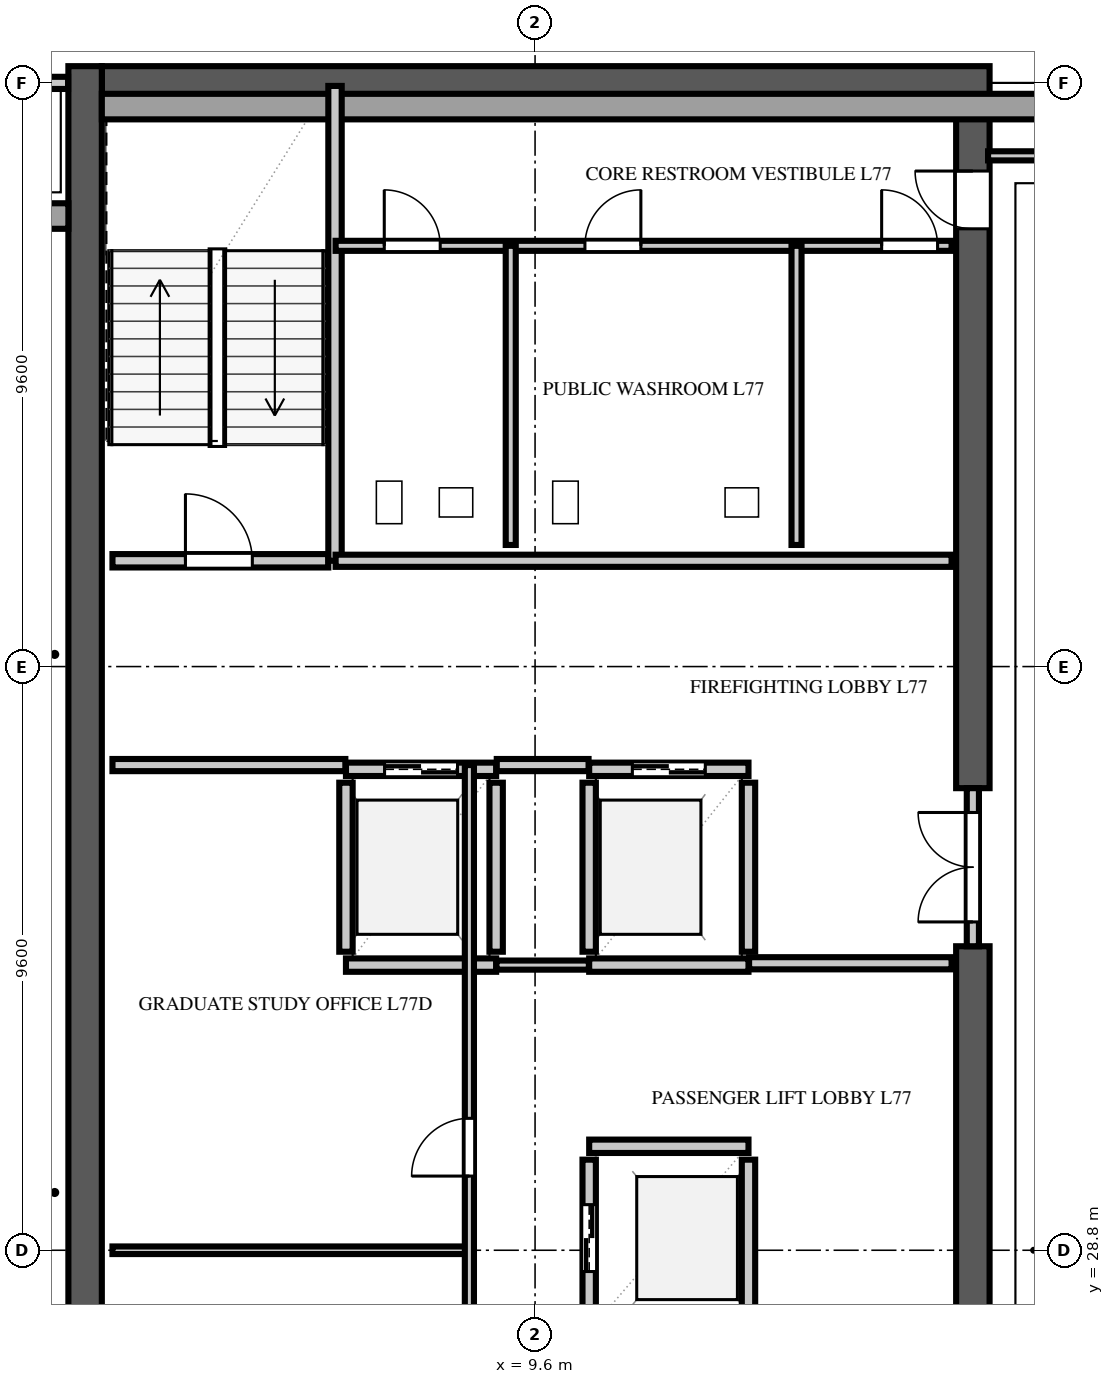
"""IFC4 building model, lengths in metres.
Left out: names, types, materials, properties, quantities, classifications, styles, units other than length and angle.
Written with IfcOpenShell. Run it as: python <this file> out.ifc"""

import sys

from ifc_helpers import new_model, si_unit, direction, frame, frame_2d, origin, place, context, subcontext, project, spatial, rectangle, extrude, element, fill, save


model = new_model("IFC4")
c1 = context("Model", 3, precision=1e-05, world=origin(), true_north=direction((0.0, 1.0)))
c2 = subcontext(c1, "Body", "Model", "MODEL_VIEW")
j1 = project(units=[si_unit("LENGTHUNIT", "METRE"), si_unit("PLANEANGLEUNIT", "RADIAN")], contexts=[c1])
p1 = place(None, origin())
s1 = spatial("IfcSite", under=j1, at=p1, CompositionType="ELEMENT")
p2 = place(p1, origin())
s2 = spatial("IfcBuilding", under=s1, at=p2, CompositionType="ELEMENT")
p3 = place(p2, frame((0.0, 0.0, 303.8)))
s3 = spatial("IfcBuildingStorey", under=s2, at=p3, CompositionType="ELEMENT", Elevation=303.8)
p4 = place(p3, frame((2.475, 48.0, 0.0), z_axis=(0.0, 0.0, 1.0), x_axis=(1.0, 0.0, 0.0)))
e1 = element("IfcWall", 1, at=p4, inside=s3, PredefinedType="SHEAR", context=c2, shape_type="SweptSolid", body=[
    extrude(rectangle(XDim=14.6, YDim=0.55, at=frame_2d((7.3, 0.0))), origin(), (0.0, 0.0, 1.0), 3.88),
])
p5 = place(p3, frame((2.2, 9.325, 0.0), z_axis=(0.0, 0.0, 1.0), x_axis=(0.0, 1.0, 0.0)))
e2 = element("IfcWall", 2, at=p5, inside=s3, PredefinedType="SHEAR", context=c2, shape_type="SweptSolid", body=[
    extrude(rectangle(XDim=38.95, YDim=0.55, at=frame_2d((19.475, 0.0))), origin(), (0.0, 0.0, 1.0), 3.88),
])
p6 = place(p3, frame((16.8, 26.0, 0.0), z_axis=(0.0, 0.0, 1.0), x_axis=(0.0, 1.0, 0.0)))
e3 = element("IfcWall", 3, at=p6, inside=s3, PredefinedType="SHEAR", context=c2, shape_type="SweptSolid", body=[
    extrude(rectangle(XDim=7.8, YDim=0.55, at=frame_2d((3.9, 0.0))), origin(), (0.0, 0.0, 1.0), 3.88),
])
p7 = place(p3, frame((16.8, 36.4, 0.0), z_axis=(0.0, 0.0, 1.0), x_axis=(0.0, 1.0, 0.0)))
e4 = element("IfcWall", 4, at=p7, inside=s3, PredefinedType="SHEAR", context=c2, shape_type="SweptSolid", body=[
    extrude(rectangle(XDim=11.325, YDim=0.55, at=frame_2d((5.663, 0.0))), origin(), (0.0, 0.0, 1.0), 3.88),
])
p8 = place(p7, frame((9.2, 0.0, 0.0)))
e5 = element("IfcOpeningElement", 5, at=p8, cuts=e4, PredefinedType="OPENING", context=c2, shape_type="SweptSolid", body=[
    extrude(rectangle(XDim=0.95, YDim=2.15, at=frame_2d((0.475, 1.075))), frame((0.0, 0.287, 0.0), z_axis=(0.0, -1.0, 0.0), x_axis=(1.0, 0.0, 0.0)), (0.0, 0.0, 1.0), 0.574),
])
p9 = place(p3, frame((36.56, 47.61, 0.0), z_axis=(0.0, 0.0, 1.0), x_axis=(-1.0, 0.0, 0.0)))
e6 = element("IfcWall", 6, at=p9, inside=s3, PredefinedType="SOLIDWALL", context=c2, shape_type="SweptSolid", body=[
    extrude(rectangle(XDim=34.085, YDim=0.42, at=frame_2d((17.042, 0.0))), origin(), (0.0, 0.0, 1.0), 3.88),
])
p10 = place(p9, frame((8.76, 0.0, 0.75)))
e7 = element("IfcOpeningElement", 7, at=p10, cuts=e6, PredefinedType="OPENING", context=c2, shape_type="SweptSolid", body=[
    extrude(rectangle(XDim=2.8, YDim=2.3, at=frame_2d((1.4, 1.15))), frame((0.0, 0.222, 0.0), z_axis=(0.0, -1.0, 0.0), x_axis=(1.0, 0.0, 0.0)), (0.0, 0.0, 1.0), 0.444),
])
p11 = place(p9, frame((13.56, 0.0, 0.75)))
e8 = element("IfcOpeningElement", 8, at=p11, cuts=e6, PredefinedType="OPENING", context=c2, shape_type="SweptSolid", body=[
    extrude(rectangle(XDim=2.8, YDim=2.3, at=frame_2d((1.4, 1.15))), frame((0.0, 0.222, 0.0), z_axis=(0.0, -1.0, 0.0), x_axis=(1.0, 0.0, 0.0)), (0.0, 0.0, 1.0), 0.444),
])
p12 = place(p3, frame((1.925, 45.81, 0.0), z_axis=(0.0, 0.0, 1.0), x_axis=(-1.0, 0.0, 0.0)))
e9 = element("IfcWall", 9, at=p12, inside=s3, PredefinedType="SOLIDWALL", context=c2, shape_type="SweptSolid", body=[
    extrude(rectangle(XDim=1.885, YDim=0.42, at=frame_2d((0.942, 0.0))), origin(), (0.0, 0.0, 1.0), 3.88),
])
p13 = place(p3, frame((2.65, 40.14, 0.0), z_axis=(0.0, 0.0, 1.0), x_axis=(1.0, 0.0, 0.0)))
e10 = element("IfcWall", 10, at=p13, inside=s3, PredefinedType="SOLIDWALL", context=c2, shape_type="SweptSolid", body=[
    extrude(rectangle(XDim=3.55, YDim=0.22, at=frame_2d((1.775, 0.0))), origin(), (0.0, 0.0, 1.0), 3.88),
])
p14 = place(p13, frame((1.2, 0.0, 0.0)))
e11 = element("IfcOpeningElement", 11, at=p14, cuts=e10, PredefinedType="OPENING", context=c2, shape_type="SweptSolid", body=[
    extrude(rectangle(XDim=1.1, YDim=2.2, at=frame_2d((0.55, 1.1))), frame((0.0, 0.122, 0.0), z_axis=(0.0, -1.0, 0.0), x_axis=(1.0, 0.0, 0.0)), (0.0, 0.0, 1.0), 0.244),
])
p15 = place(p3, frame((6.31, 40.14, 0.0), z_axis=(0.0, 0.0, 1.0), x_axis=(0.0, 1.0, 0.0)))
e12 = element("IfcWall", 12, at=p15, inside=s3, PredefinedType="SOLIDWALL", context=c2, shape_type="SweptSolid", body=[
    extrude(rectangle(XDim=7.81, YDim=0.22, at=frame_2d((3.905, 0.0))), origin(), (0.0, 0.0, 1.0), 3.88),
])
p16 = place(p3, frame((10.49, 27.71, 0.0), z_axis=(0.0, 0.0, 1.0), x_axis=(0.0, 1.0, 0.0)))
e13 = element("IfcWall", 13, at=p16, inside=s3, PredefinedType="SOLIDWALL", context=c2, shape_type="SweptSolid", body=[
    extrude(rectangle(XDim=2.58, YDim=0.22, at=frame_2d((1.29, 0.0))), origin(), (0.0, 0.0, 1.0), 3.88),
])
p17 = place(p16, frame((0.74, 0.0, 0.0)))
e14 = element("IfcOpeningElement", 14, at=p17, cuts=e13, PredefinedType="OPENING", context=c2, shape_type="SweptSolid", body=[
    extrude(rectangle(XDim=1.1, YDim=2.2, at=frame_2d((0.55, 1.1))), frame((0.0, 0.122, 0.0), z_axis=(0.0, -1.0, 0.0), x_axis=(1.0, 0.0, 0.0)), (0.0, 0.0, 1.0), 0.244),
])
p18 = place(p3, frame((13.11, 27.71, 0.0), z_axis=(0.0, 0.0, 1.0), x_axis=(0.0, 1.0, 0.0)))
e15 = element("IfcWall", 15, at=p18, inside=s3, PredefinedType="SOLIDWALL", context=c2, shape_type="SweptSolid", body=[
    extrude(rectangle(XDim=2.58, YDim=0.22, at=frame_2d((1.29, 0.0))), origin(), (0.0, 0.0, 1.0), 3.88),
])
p19 = place(p3, frame((10.49, 30.51, 0.0), z_axis=(0.0, 0.0, 1.0), x_axis=(1.0, 0.0, 0.0)))
e16 = element("IfcWall", 16, at=p19, inside=s3, PredefinedType="SOLIDWALL", context=c2, shape_type="SweptSolid", body=[
    extrude(rectangle(XDim=2.62, YDim=0.22, at=frame_2d((1.31, 0.0))), origin(), (0.0, 0.0, 1.0), 3.88),
])
for number, where, z_axis, x_axis in (
    (17, (6.49, 33.71, 0.0), (0.0, 0.0, 1.0), (0.0, 1.0, 0.0)),
    (18, (8.96, 33.71, 0.0), (0.0, 0.0, 1.0), (0.0, 1.0, 0.0)),
):
    element("IfcWall", number, at=place(p3, frame(where, z_axis=z_axis, x_axis=x_axis)), inside=s3, PredefinedType="SOLIDWALL", context=c2, shape_type="SweptSolid", body=[
        extrude(rectangle(XDim=2.78, YDim=0.22, at=frame_2d((1.39, 0.0))), origin(), (0.0, 0.0, 1.0), 3.88),
    ])
p20 = place(p3, frame((6.49, 33.49, 0.0), z_axis=(0.0, 0.0, 1.0), x_axis=(1.0, 0.0, 0.0)))
e19 = element("IfcWall", 19, at=p20, inside=s3, PredefinedType="SOLIDWALL", context=c2, shape_type="SweptSolid", body=[
    extrude(rectangle(XDim=2.47, YDim=0.22, at=frame_2d((1.235, 0.0))), origin(), (0.0, 0.0, 1.0), 3.88),
])
p21 = place(p3, frame((6.49, 36.71, 0.0), z_axis=(0.0, 0.0, 1.0), x_axis=(1.0, 0.0, 0.0)))
e20 = element("IfcWall", 20, at=p21, inside=s3, PredefinedType="SOLIDWALL", context=c2, shape_type="SweptSolid", body=[
    extrude(rectangle(XDim=2.47, YDim=0.22, at=frame_2d((1.235, 0.0))), origin(), (0.0, 0.0, 1.0), 3.88),
])
p22 = place(p21, frame((0.635, 0.0, 0.0)))
e21 = element("IfcOpeningElement", 21, at=p22, cuts=e20, PredefinedType="OPENING", context=c2, shape_type="SweptSolid", body=[
    extrude(rectangle(XDim=1.2, YDim=2.2, at=frame_2d((0.6, 1.1))), frame((0.0, 0.122, 0.0), z_axis=(0.0, -1.0, 0.0), x_axis=(1.0, 0.0, 0.0)), (0.0, 0.0, 1.0), 0.244),
])
for number, where, z_axis, x_axis in (
    (22, (10.49, 33.71, 0.0), (0.0, 0.0, 1.0), (0.0, 1.0, 0.0)),
    (23, (13.11, 33.71, 0.0), (0.0, 0.0, 1.0), (0.0, 1.0, 0.0)),
):
    element("IfcWall", number, at=place(p3, frame(where, z_axis=z_axis, x_axis=x_axis)), inside=s3, PredefinedType="SOLIDWALL", context=c2, shape_type="SweptSolid", body=[
        extrude(rectangle(XDim=2.78, YDim=0.22, at=frame_2d((1.39, 0.0))), origin(), (0.0, 0.0, 1.0), 3.88),
    ])
p23 = place(p3, frame((10.49, 33.49, 0.0), z_axis=(0.0, 0.0, 1.0), x_axis=(1.0, 0.0, 0.0)))
e24 = element("IfcWall", 24, at=p23, inside=s3, PredefinedType="SOLIDWALL", context=c2, shape_type="SweptSolid", body=[
    extrude(rectangle(XDim=2.62, YDim=0.22, at=frame_2d((1.31, 0.0))), origin(), (0.0, 0.0, 1.0), 3.88),
])
p24 = place(p3, frame((10.49, 36.71, 0.0), z_axis=(0.0, 0.0, 1.0), x_axis=(1.0, 0.0, 0.0)))
e25 = element("IfcWall", 25, at=p24, inside=s3, PredefinedType="SOLIDWALL", context=c2, shape_type="SweptSolid", body=[
    extrude(rectangle(XDim=2.62, YDim=0.22, at=frame_2d((1.31, 0.0))), origin(), (0.0, 0.0, 1.0), 3.88),
])
p25 = place(p24, frame((0.71, 0.0, 0.0)))
e26 = element("IfcOpeningElement", 26, at=p25, cuts=e25, PredefinedType="OPENING", context=c2, shape_type="SweptSolid", body=[
    extrude(rectangle(XDim=1.2, YDim=2.2, at=frame_2d((0.6, 1.1))), frame((0.0, 0.122, 0.0), z_axis=(0.0, -1.0, 0.0), x_axis=(1.0, 0.0, 0.0)), (0.0, 0.0, 1.0), 0.244),
])
p26 = place(p3, frame((2.65, 36.78, 0.0), z_axis=(0.0, 0.0, 1.0), x_axis=(1.0, 0.0, 0.0)))
e27 = element("IfcWall", 27, at=p26, inside=s3, PredefinedType="SOLIDWALL", context=c2, shape_type="SweptSolid", body=[
    extrude(rectangle(XDim=3.83, YDim=0.2, at=frame_2d((1.915, 0.0))), origin(), (0.0, 0.0, 1.0), 3.88),
])
p27 = place(p3, frame((8.97, 36.78, 0.0), z_axis=(0.0, 0.0, 1.0), x_axis=(1.0, 0.0, 0.0)))
e28 = element("IfcWall", 28, at=p27, inside=s3, PredefinedType="SOLIDWALL", context=c2, shape_type="SweptSolid", body=[
    extrude(rectangle(XDim=1.51, YDim=0.2, at=frame_2d((0.755, 0.0))), origin(), (0.0, 0.0, 1.0), 3.88),
])
p28 = place(p3, frame((13.12, 33.52, 0.0), z_axis=(0.0, 0.0, 1.0), x_axis=(1.0, 0.0, 0.0)))
e29 = element("IfcWall", 29, at=p28, inside=s3, PredefinedType="SOLIDWALL", context=c2, shape_type="SweptSolid", body=[
    extrude(rectangle(XDim=3.33, YDim=0.2, at=frame_2d((1.665, 0.0))), origin(), (0.0, 0.0, 1.0), 3.88),
])
p29 = place(p3, frame((6.32, 40.14, 0.0), z_axis=(0.0, 0.0, 1.0), x_axis=(1.0, 0.0, 0.0)))
e30 = element("IfcWall", 30, at=p29, inside=s3, PredefinedType="SOLIDWALL", context=c2, shape_type="SweptSolid", body=[
    extrude(rectangle(XDim=10.13, YDim=0.2, at=frame_2d((5.065, 0.0))), origin(), (0.0, 0.0, 1.0), 3.88),
])
p30 = place(p3, frame((16.8, 33.8, 0.0), z_axis=(0.0, 0.0, 1.0), x_axis=(0.0, 1.0, 0.0)))
e31 = element("IfcWall", 31, at=p30, inside=s3, PredefinedType="SOLIDWALL", context=c2, shape_type="SweptSolid", body=[
    extrude(rectangle(XDim=2.6, YDim=0.2, at=frame_2d((1.3, 0.0))), origin(), (0.0, 0.0, 1.0), 3.88),
])
p31 = place(p30, frame((0.4, 0.0, 0.0)))
e32 = element("IfcOpeningElement", 32, at=p31, cuts=e31, PredefinedType="OPENING", context=c2, shape_type="SweptSolid", body=[
    extrude(rectangle(XDim=1.8, YDim=2.2, at=frame_2d((0.9, 1.1))), frame((0.0, 0.112, 0.0), z_axis=(0.0, -1.0, 0.0), x_axis=(1.0, 0.0, 0.0)), (0.0, 0.0, 1.0), 0.224),
])
p32 = place(p3, frame((8.965, 33.49, 0.0), z_axis=(0.0, 0.0, 1.0), x_axis=(1.0, 0.0, 0.0)))
e33 = element("IfcWall", 33, at=p32, inside=s3, PredefinedType="PARTITIONING", context=c2, shape_type="SweptSolid", body=[
    extrude(rectangle(XDim=1.52, YDim=0.15, at=frame_2d((0.76, 0.0))), origin(), (0.0, 0.0, 1.0), 3.88),
])
p33 = place(p3, frame((2.65, 28.8, 0.0), z_axis=(0.0, 0.0, 1.0), x_axis=(1.0, 0.0, 0.0)))
e34 = element("IfcWall", 34, at=p33, inside=s3, PredefinedType="PARTITIONING", context=c2, shape_type="SweptSolid", body=[
    extrude(rectangle(XDim=5.87, YDim=0.125, at=frame_2d((2.935, 0.0))), origin(), (0.0, 0.0, 1.0), 3.88),
])
p34 = place(p3, frame((8.52, 12.02, 0.0), z_axis=(0.0, 0.0, 1.0), x_axis=(0.0, 1.0, 0.0)))
e35 = element("IfcWall", 35, at=p34, inside=s3, PredefinedType="PARTITIONING", context=c2, shape_type="SweptSolid", body=[
    extrude(rectangle(XDim=24.76, YDim=0.15, at=frame_2d((12.38, 0.0))), origin(), (0.0, 0.0, 1.0), 3.88),
])
p35 = place(p34, frame((2.0, 0.0, 0.0)))
e36 = element("IfcOpeningElement", 36, at=p35, cuts=e35, PredefinedType="OPENING", context=c2, shape_type="SweptSolid", body=[
    extrude(rectangle(XDim=0.85, YDim=2.1, at=frame_2d((0.425, 1.05))), frame((0.0, 0.087, 0.0), z_axis=(0.0, -1.0, 0.0), x_axis=(1.0, 0.0, 0.0)), (0.0, 0.0, 1.0), 0.174),
])
p36 = place(p34, frame((11.0, 0.0, 0.0)))
e37 = element("IfcOpeningElement", 37, at=p36, cuts=e35, PredefinedType="OPENING", context=c2, shape_type="SweptSolid", body=[
    extrude(rectangle(XDim=0.95, YDim=2.15, at=frame_2d((0.475, 1.075))), frame((0.0, 0.087, 0.0), z_axis=(0.0, -1.0, 0.0), x_axis=(1.0, 0.0, 0.0)), (0.0, 0.0, 1.0), 0.174),
])
p37 = place(p34, frame((18.0, 0.0, 0.0)))
e38 = element("IfcOpeningElement", 38, at=p37, cuts=e35, PredefinedType="OPENING", context=c2, shape_type="SweptSolid", body=[
    extrude(rectangle(XDim=0.95, YDim=2.15, at=frame_2d((0.475, 1.075))), frame((0.0, 0.087, 0.0), z_axis=(0.0, -1.0, 0.0), x_axis=(1.0, 0.0, 0.0)), (0.0, 0.0, 1.0), 0.174),
])
p38 = place(p3, frame((6.32, 45.32, 0.0), z_axis=(0.0, 0.0, 1.0), x_axis=(1.0, 0.0, 0.0)))
e39 = element("IfcWall", 39, at=p38, inside=s3, PredefinedType="PLUMBINGWALL", context=c2, shape_type="SweptSolid", body=[
    extrude(rectangle(XDim=10.13, YDim=0.165, at=frame_2d((5.065, 0.0))), origin(), (0.0, 0.0, 1.0), 3.88),
])
p39 = place(p38, frame((0.8, 0.0, 0.0)))
e40 = element("IfcOpeningElement", 40, at=p39, cuts=e39, PredefinedType="OPENING", context=c2, shape_type="SweptSolid", body=[
    extrude(rectangle(XDim=0.92, YDim=2.15, at=frame_2d((0.46, 1.075))), frame((0.0, 0.094, 0.0), z_axis=(0.0, -1.0, 0.0), x_axis=(1.0, 0.0, 0.0)), (0.0, 0.0, 1.0), 0.189),
])
p40 = place(p38, frame((4.1, 0.0, 0.0)))
e41 = element("IfcOpeningElement", 41, at=p40, cuts=e39, PredefinedType="OPENING", context=c2, shape_type="SweptSolid", body=[
    extrude(rectangle(XDim=0.92, YDim=2.15, at=frame_2d((0.46, 1.075))), frame((0.0, 0.094, 0.0), z_axis=(0.0, -1.0, 0.0), x_axis=(1.0, 0.0, 0.0)), (0.0, 0.0, 1.0), 0.189),
])
p41 = place(p38, frame((8.98, 0.0, 0.0)))
e42 = element("IfcOpeningElement", 42, at=p41, cuts=e39, PredefinedType="OPENING", context=c2, shape_type="SweptSolid", body=[
    extrude(rectangle(XDim=0.92, YDim=2.15, at=frame_2d((0.46, 1.075))), frame((0.0, 0.094, 0.0), z_axis=(0.0, -1.0, 0.0), x_axis=(1.0, 0.0, 0.0)), (0.0, 0.0, 1.0), 0.189),
])
for number, where, z_axis, x_axis in (
    (43, (9.2, 40.4, 0.0), (0.0, 0.0, 1.0), (0.0, 1.0, 0.0)),
    (44, (13.9, 40.4, 0.0), (0.0, 0.0, 1.0), (0.0, 1.0, 0.0)),
):
    element("IfcWall", number, at=place(p3, frame(where, z_axis=z_axis, x_axis=x_axis)), inside=s3, PredefinedType="PLUMBINGWALL", context=c2, shape_type="SweptSolid", body=[
        extrude(rectangle(XDim=4.92, YDim=0.165, at=frame_2d((2.46, 0.0))), origin(), (0.0, 0.0, 1.0), 3.88),
    ])
p42 = place(p3, frame((0.85, 48.0, 0.0), z_axis=(0.0, 0.0, 1.0), x_axis=(1.0, 0.0, 0.0)))
e45 = element("IfcWall", 45, at=p42, inside=s3, PredefinedType="SOLIDWALL", context=c2, shape_type="SweptSolid", body=[
    extrude(rectangle(XDim=1.07, YDim=0.2, at=frame_2d((0.535, 0.0))), origin(), (0.0, 0.0, 1.0), 3.88),
])
p43 = place(p3, frame((17.05, 46.8, 0.0), z_axis=(0.0, 0.0, 1.0), x_axis=(1.0, 0.0, 0.0)))
e46 = element("IfcWall", 46, at=p43, inside=s3, PredefinedType="PARTITIONING", context=c2, shape_type="SweptSolid", body=[
    extrude(rectangle(XDim=2.15, YDim=0.15, at=frame_2d((1.075, 0.0))), origin(), (0.0, 0.0, 1.0), 3.88),
])
p44 = place(p14, origin())
e47 = element("IfcDoor", 47, at=p44, inside=s3, OperationType="SINGLE_SWING_LEFT", PredefinedType="DOOR", context=c2, shape_type="SweptSolid", body=[
    extrude(rectangle(XDim=1.1, YDim=2.2, at=frame_2d((0.55, 1.1))), frame((0.0, 0.025, 0.0), z_axis=(0.0, -1.0, 0.0), x_axis=(1.0, 0.0, 0.0)), (0.0, 0.0, 1.0), 0.05),
])
fill(e11, e47)
p45 = place(p17, origin())
e48 = element("IfcDoor", 48, at=p45, inside=s3, OperationType="DOUBLE_DOOR_SLIDING", PredefinedType="DOOR", context=c2, shape_type="SweptSolid", body=[
    extrude(rectangle(XDim=1.1, YDim=2.2, at=frame_2d((0.55, 1.1))), frame((0.0, 0.025, 0.0), z_axis=(0.0, -1.0, 0.0), x_axis=(1.0, 0.0, 0.0)), (0.0, 0.0, 1.0), 0.05),
])
fill(e14, e48)
p46 = place(p22, origin())
e49 = element("IfcDoor", 49, at=p46, inside=s3, OperationType="DOUBLE_DOOR_SLIDING", PredefinedType="DOOR", context=c2, shape_type="SweptSolid", body=[
    extrude(rectangle(XDim=1.2, YDim=2.2, at=frame_2d((0.6, 1.1))), frame((0.0, 0.025, 0.0), z_axis=(0.0, -1.0, 0.0), x_axis=(1.0, 0.0, 0.0)), (0.0, 0.0, 1.0), 0.05),
])
fill(e21, e49)
p47 = place(p25, origin())
e50 = element("IfcDoor", 50, at=p47, inside=s3, OperationType="DOUBLE_DOOR_SLIDING", PredefinedType="DOOR", context=c2, shape_type="SweptSolid", body=[
    extrude(rectangle(XDim=1.2, YDim=2.2, at=frame_2d((0.6, 1.1))), frame((0.0, 0.025, 0.0), z_axis=(0.0, -1.0, 0.0), x_axis=(1.0, 0.0, 0.0)), (0.0, 0.0, 1.0), 0.05),
])
fill(e26, e50)
p48 = place(p8, origin())
e51 = element("IfcDoor", 51, at=p48, inside=s3, OperationType="SINGLE_SWING_RIGHT", PredefinedType="DOOR", context=c2, shape_type="SweptSolid", body=[
    extrude(rectangle(XDim=0.95, YDim=2.15, at=frame_2d((0.475, 1.075))), frame((0.0, 0.025, 0.0), z_axis=(0.0, -1.0, 0.0), x_axis=(1.0, 0.0, 0.0)), (0.0, 0.0, 1.0), 0.05),
])
fill(e5, e51)
p49 = place(p31, origin())
e52 = element("IfcDoor", 52, at=p49, inside=s3, OperationType="DOUBLE_DOOR_SINGLE_SWING", PredefinedType="DOOR", context=c2, shape_type="SweptSolid", body=[
    extrude(rectangle(XDim=1.8, YDim=2.2, at=frame_2d((0.9, 1.1))), frame((0.0, 0.025, 0.0), z_axis=(0.0, -1.0, 0.0), x_axis=(1.0, 0.0, 0.0)), (0.0, 0.0, 1.0), 0.05),
])
fill(e32, e52)
p50 = place(p37, origin())
e53 = element("IfcDoor", 53, at=p50, inside=s3, OperationType="SINGLE_SWING_LEFT", PredefinedType="DOOR", context=c2, shape_type="SweptSolid", body=[
    extrude(rectangle(XDim=0.95, YDim=2.15, at=frame_2d((0.475, 1.075))), frame((0.0, 0.025, 0.0), z_axis=(0.0, -1.0, 0.0), x_axis=(1.0, 0.0, 0.0)), (0.0, 0.0, 1.0), 0.05),
])
fill(e38, e53)
p51 = place(p39, origin())
e54 = element("IfcDoor", 54, at=p51, inside=s3, OperationType="SINGLE_SWING_LEFT", PredefinedType="DOOR", context=c2, shape_type="SweptSolid", body=[
    extrude(rectangle(XDim=0.92, YDim=2.15, at=frame_2d((0.46, 1.075))), frame((0.0, 0.025, 0.0), z_axis=(0.0, -1.0, 0.0), x_axis=(1.0, 0.0, 0.0)), (0.0, 0.0, 1.0), 0.05),
])
fill(e40, e54)
p52 = place(p40, origin())
e55 = element("IfcDoor", 55, at=p52, inside=s3, OperationType="SINGLE_SWING_RIGHT", PredefinedType="DOOR", context=c2, shape_type="SweptSolid", body=[
    extrude(rectangle(XDim=0.92, YDim=2.15, at=frame_2d((0.46, 1.075))), frame((0.0, 0.025, 0.0), z_axis=(0.0, -1.0, 0.0), x_axis=(1.0, 0.0, 0.0)), (0.0, 0.0, 1.0), 0.05),
])
fill(e41, e55)
p53 = place(p41, origin())
e56 = element("IfcDoor", 56, at=p53, inside=s3, OperationType="SINGLE_SWING_LEFT", PredefinedType="DOOR", context=c2, shape_type="SweptSolid", body=[
    extrude(rectangle(XDim=0.92, YDim=2.15, at=frame_2d((0.46, 1.075))), frame((0.0, 0.025, 0.0), z_axis=(0.0, -1.0, 0.0), x_axis=(1.0, 0.0, 0.0)), (0.0, 0.0, 1.0), 0.05),
])
fill(e42, e56)
save(model, sys.argv[1])
